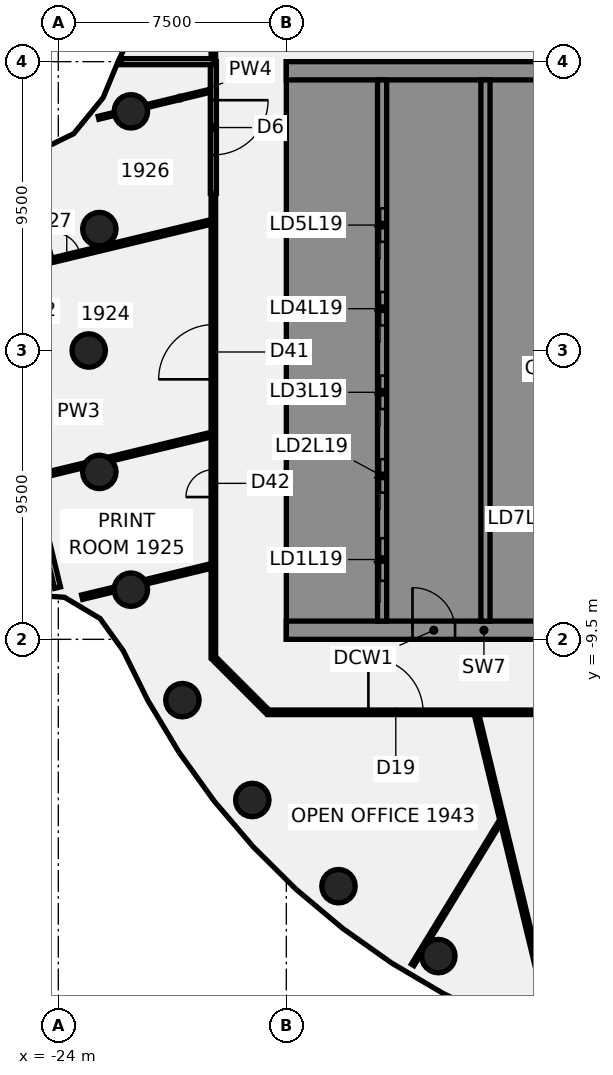
"""IFC4 building model, lengths in metres.
Left out: names, types, materials, properties, quantities, classifications, styles, units other than length and angle.
Written with IfcOpenShell. Run it as: python <this file> out.ifc"""

import sys

from ifc_helpers import new_model, si_unit, direction, frame, frame_2d, origin, origin_2d, place, context, subcontext, project, spatial, polyline, rectangle, circle, outline, extrude, element, fill, save


model = new_model("IFC4")
c1 = context("Model", 3, precision=1e-05, world=origin(), true_north=direction((0.0, 1.0)))
c2 = subcontext(c1, "Body", "Model", "MODEL_VIEW")
j1 = project(units=[si_unit("LENGTHUNIT", "METRE"), si_unit("PLANEANGLEUNIT", "RADIAN")], contexts=[c1])
p1 = place(None, origin())
s1 = spatial("IfcSite", under=j1, at=p1, CompositionType="ELEMENT")
p2 = place(p1, origin())
s2 = spatial("IfcBuilding", under=s1, at=p2, CompositionType="ELEMENT")
p3 = place(p2, frame((0.0, 0.0, 83.5)))
s3 = spatial("IfcBuildingStorey", under=s2, at=p3, CompositionType="ELEMENT", Elevation=83.5)
for number, where, z_axis, x_axis in (
    (1, (-21.613, 7.866, -0.14), (0.0, 0.0, 1.0), (1.0, 0.0, 0.0)),
    (2, (-22.651, 3.994, -0.14), (0.0, 0.0, 1.0), (1.0, 0.0, 0.0)),
    (3, (-23.0, 0.0, -0.14), (0.0, 0.0, 1.0), (1.0, 0.0, 0.0)),
    (4, (-22.651, -3.994, -0.14), (0.0, 0.0, 1.0), (1.0, 0.0, 0.0)),
    (5, (-21.613, -7.866, -0.14), (0.0, 0.0, 1.0), (1.0, 0.0, 0.0)),
    (6, (-19.919, -11.5, -0.14), (0.0, 0.0, 1.0), (1.0, 0.0, 0.0)),
    (7, (-17.619, -14.784, -0.14), (0.0, 0.0, 1.0), (1.0, 0.0, 0.0)),
    (8, (-14.784, -17.619, -0.14), (0.0, 0.0, 1.0), (1.0, 0.0, 0.0)),
    (9, (-11.5, -19.919, -0.14), (0.0, 0.0, 1.0), (1.0, 0.0, 0.0)),
    (10, (-7.866, -21.613, -0.14), (0.0, 0.0, 1.0), (1.0, 0.0, 0.0)),
):
    element("IfcColumn", number, at=place(p3, frame(where, z_axis=z_axis, x_axis=x_axis)), inside=s3, PredefinedType="COLUMN", context=c2, shape_type="SweptSolid", body=[
        extrude(circle(Radius=0.55, at=origin_2d()), origin(), (0.0, 0.0, 1.0), 3.75),
    ])
p4 = place(p3, frame((-27.267, 5.619, 0.0), z_axis=(0.0, 0.0, 1.0), x_axis=(0.234742525012, -0.972057584174, 0.0)))
e11 = element("IfcWall", 11, at=p4, inside=s3, PredefinedType="PARTITIONING", context=c2, shape_type="SweptSolid", body=[
    extrude(rectangle(XDim=13.805, YDim=0.2, at=frame_2d((6.903, 0.0))), origin(), (0.0, 0.0, 1.0), 3.01),
])
p5 = place(p4, frame((6.099, 0.0, 0.0)))
e12 = element("IfcOpeningElement", 12, at=p5, cuts=e11, PredefinedType="OPENING", context=c2, shape_type="SweptSolid", body=[
    extrude(rectangle(XDim=1.4, YDim=2.1, at=frame_2d((0.7, 1.05))), frame((0.0, 0.11, 0.0), z_axis=(0.0, -1.0, 0.0), x_axis=(1.0, 0.0, 0.0)), (0.0, 0.0, 1.0), 0.22),
])
p6 = place(p3, frame((-10.241, -11.973, 0.0), z_axis=(0.0, 0.0, 1.0), x_axis=(0.234983700505, -0.971999310955, 0.0)))
e13 = element("IfcWall", 13, at=p6, inside=s3, PredefinedType="PARTITIONING", context=c2, shape_type="SweptSolid", body=[
    extrude(rectangle(XDim=9.388, YDim=0.15, at=frame_2d((4.694, 0.0))), origin(), (0.0, 0.0, 1.0), 3.01),
])
p7 = place(p3, frame((-18.872, -10.128, 0.0), z_axis=(0.0, 0.0, 1.0), x_axis=(0.707106781187, -0.707106781187, 0.0)))
e14 = element("IfcWall", 14, at=p7, inside=s3, PredefinedType="PARTITIONING", context=c2, shape_type="SweptSolid", body=[
    extrude(rectangle(XDim=2.465, YDim=0.15, at=frame_2d((1.232, 0.0))), origin(), (0.0, 0.0, 1.0), 3.01),
])
p8 = place(p3, frame((-17.1, -11.9, 0.0), z_axis=(0.0, 0.0, 1.0), x_axis=(1.0, 0.0, 0.0)))
e15 = element("IfcWall", 15, at=p8, inside=s3, PredefinedType="PARTITIONING", context=c2, shape_type="SweptSolid", body=[
    extrude(rectangle(XDim=34.165, YDim=0.15, at=frame_2d((17.083, 0.0))), origin(), (0.0, 0.0, 1.0), 3.01),
])
p9 = place(p8, frame((13.712, 0.0, 0.0)))
e16 = element("IfcOpeningElement", 16, at=p9, cuts=e15, PredefinedType="OPENING", context=c2, shape_type="SweptSolid", body=[
    extrude(rectangle(XDim=1.8, YDim=2.1, at=frame_2d((0.9, 1.05))), frame((0.0, 0.085, 0.0), z_axis=(0.0, -1.0, 0.0), x_axis=(1.0, 0.0, 0.0)), (0.0, 0.0, 1.0), 0.17),
])
p10 = place(p8, frame((3.3, 0.0, 0.0)))
e17 = element("IfcOpeningElement", 17, at=p10, cuts=e15, PredefinedType="OPENING", context=c2, shape_type="SweptSolid", body=[
    extrude(rectangle(XDim=1.8, YDim=2.1, at=frame_2d((0.9, 1.05))), frame((0.0, 0.085, 0.0), z_axis=(0.0, -1.0, 0.0), x_axis=(1.0, 0.0, 0.0)), (0.0, 0.0, 1.0), 0.17),
])
p11 = place(p8, frame((27.428, 0.0, 0.0)))
e18 = element("IfcOpeningElement", 18, at=p11, cuts=e15, PredefinedType="OPENING", context=c2, shape_type="SweptSolid", body=[
    extrude(rectangle(XDim=1.8, YDim=2.1, at=frame_2d((0.9, 1.05))), frame((0.0, 0.085, 0.0), z_axis=(0.0, -1.0, 0.0), x_axis=(1.0, 0.0, 0.0)), (0.0, 0.0, 1.0), 0.17),
])
p12 = place(p3, frame((-26.395, 2.437, 0.0), z_axis=(0.0, 0.0, 1.0), x_axis=(0.97203792935, 0.234823899775, 0.0)))
e19 = element("IfcWall", 19, at=p12, inside=s3, PredefinedType="PARTITIONING", context=c2, shape_type="SweptSolid", body=[
    extrude(rectangle(XDim=7.635, YDim=0.15, at=frame_2d((3.818, 0.0))), origin(), (0.0, 0.0, 1.0), 3.01),
])
p13 = place(p12, frame((2.3, 0.0, 0.0)))
e20 = element("IfcOpeningElement", 20, at=p13, cuts=e19, PredefinedType="OPENING", context=c2, shape_type="SweptSolid", body=[
    extrude(rectangle(XDim=0.9, YDim=2.1, at=frame_2d((0.45, 1.05))), frame((0.0, 0.085, 0.0), z_axis=(0.0, -1.0, 0.0), x_axis=(1.0, 0.0, 0.0)), (0.0, 0.0, 1.0), 0.17),
])
p14 = place(p3, frame((-24.798, -4.174, 0.0), z_axis=(0.0, 0.0, 1.0), x_axis=(0.972053847495, 0.234757997882, 0.0)))
e21 = element("IfcWall", 21, at=p14, inside=s3, PredefinedType="PARTITIONING", context=c2, shape_type="SweptSolid", body=[
    extrude(rectangle(XDim=1.693, YDim=0.15, at=frame_2d((0.847, 0.0))), origin(), (0.0, 0.0, 1.0), 3.01),
])
p15 = place(p3, frame((-22.308, -3.572, 0.0), z_axis=(0.0, 0.0, 1.0), x_axis=(0.972049735002, 0.234775025681, 0.0)))
e22 = element("IfcWall", 22, at=p15, inside=s3, PredefinedType="PARTITIONING", context=c2, shape_type="SweptSolid", body=[
    extrude(rectangle(XDim=3.431, YDim=0.15, at=frame_2d((1.715, 0.0))), origin(), (0.0, 0.0, 1.0), 3.01),
])
p16 = place(p3, frame((-23.217, -8.113, 0.0), z_axis=(0.0, 0.0, 1.0), x_axis=(0.972021486392, 0.234891953868, 0.0)))
e23 = element("IfcWall", 23, at=p16, inside=s3, PredefinedType="PARTITIONING", context=c2, shape_type="SweptSolid", body=[
    extrude(rectangle(XDim=1.076, YDim=0.15, at=frame_2d((0.538, 0.0))), origin(), (0.0, 0.0, 1.0), 3.01),
])
p17 = place(p3, frame((-21.123, -7.607, 0.0), z_axis=(0.0, 0.0, 1.0), x_axis=(0.9720657083, 0.234708880846, 0.0)))
e24 = element("IfcWall", 24, at=p17, inside=s3, PredefinedType="PARTITIONING", context=c2, shape_type="SweptSolid", body=[
    extrude(rectangle(XDim=2.211, YDim=0.15, at=frame_2d((1.106, 0.0))), origin(), (0.0, 0.0, 1.0), 3.01),
])
p18 = place(p3, frame((-22.677, 7.655, 0.0), z_axis=(0.0, 0.0, 1.0), x_axis=(0.972046753294, 0.234787370638, 0.0)))
e25 = element("IfcWall", 25, at=p18, inside=s3, PredefinedType="PARTITIONING", context=c2, shape_type="SweptSolid", body=[
    extrude(rectangle(XDim=0.542, YDim=0.1, at=frame_2d((0.271, 0.0))), origin(), (0.0, 0.0, 1.0), 3.01),
])
p19 = place(p3, frame((-21.098, 8.037, 0.0), z_axis=(0.0, 0.0, 1.0), x_axis=(0.971998948833, 0.234985198402, 0.0)))
e26 = element("IfcWall", 26, at=p19, inside=s3, PredefinedType="PARTITIONING", context=c2, shape_type="SweptSolid", body=[
    extrude(rectangle(XDim=2.262, YDim=0.1, at=frame_2d((1.131, 0.0))), origin(), (0.0, 0.0, 1.0), 3.01),
])
p20 = place(p3, frame((-12.342, -20.206, 0.0), z_axis=(0.0, 0.0, 1.0), x_axis=(0.521349225491, 0.853343415678, 0.0)))
e27 = element("IfcWall", 27, at=p20, inside=s3, PredefinedType="PARTITIONING", context=c2, shape_type="SweptSolid", body=[
    extrude(rectangle(XDim=5.487, YDim=0.1, at=frame_2d((2.744, 0.0))), origin(), (0.0, 0.0, 1.0), 3.01),
])
p21 = place(p3, frame((-18.9, -10.1, 0.0), z_axis=(0.0, 0.0, 1.0), x_axis=(0.0, 1.0, 0.0)))
e28 = element("IfcWall", 28, at=p21, inside=s3, PredefinedType="PARTITIONING", context=c2, shape_type="SweptSolid", body=[
    extrude(rectangle(XDim=15.166, YDim=0.15, at=frame_2d((7.583, 0.0))), origin(), (0.0, 0.0, 1.0), 3.01),
])
p22 = place(p21, frame((9.151, 0.0, 0.0)))
e29 = element("IfcOpeningElement", 29, at=p22, cuts=e28, PredefinedType="OPENING", context=c2, shape_type="SweptSolid", body=[
    extrude(rectangle(XDim=1.8, YDim=2.1, at=frame_2d((0.9, 1.05))), frame((0.0, 0.085, 0.0), z_axis=(0.0, -1.0, 0.0), x_axis=(1.0, 0.0, 0.0)), (0.0, 0.0, 1.0), 0.17),
])
p23 = place(p21, frame((5.28, 0.0, 0.0)))
e30 = element("IfcOpeningElement", 30, at=p23, cuts=e28, PredefinedType="OPENING", context=c2, shape_type="SweptSolid", body=[
    extrude(rectangle(XDim=0.9, YDim=2.1, at=frame_2d((0.45, 1.05))), frame((0.0, 0.085, 0.0), z_axis=(0.0, -1.0, 0.0), x_axis=(1.0, 0.0, 0.0)), (0.0, 0.0, 1.0), 0.17),
])
p24 = place(p3, frame((-18.9, 9.6, 0.0), z_axis=(0.0, 0.0, 1.0), x_axis=(0.0, 1.0, 0.0)))
e31 = element("IfcWall", 31, at=p24, inside=s3, PredefinedType="PARTITIONING", context=c2, shape_type="SweptSolid", body=[
    extrude(rectangle(XDim=0.5, YDim=0.15, at=frame_2d((0.25, 0.0))), origin(), (0.0, 0.0, 1.0), 3.01),
])
p25 = place(p3, frame((-18.9, 9.5, 0.0), z_axis=(0.0, 0.0, 1.0), x_axis=(0.0, -1.0, 0.0)))
e32 = element("IfcWall", 32, at=p25, inside=s3, PredefinedType="SOLIDWALL", context=c2, shape_type="SweptSolid", body=[
    extrude(rectangle(XDim=4.334, YDim=0.2, at=frame_2d((2.167, 0.0))), origin(), (0.0, 0.0, 1.0), 3.014),
])
p26 = place(p25, frame((1.267, 0.0, 0.0)))
e33 = element("IfcOpeningElement", 33, at=p26, cuts=e32, PredefinedType="OPENING", context=c2, shape_type="SweptSolid", body=[
    extrude(rectangle(XDim=1.8, YDim=2.4, at=frame_2d((0.9, 1.2))), frame((0.0, 0.11, 0.0), z_axis=(0.0, -1.0, 0.0), x_axis=(1.0, 0.0, 0.0)), (0.0, 0.0, 1.0), 0.22),
])
p27 = place(p3, frame((-18.9, 9.5, 0.0), z_axis=(0.0, 0.0, 1.0), x_axis=(-1.0, 0.0, 0.0)))
e34 = element("IfcWall", 34, at=p27, inside=s3, PredefinedType="SOLIDWALL", context=c2, shape_type="SweptSolid", body=[
    extrude(rectangle(XDim=3.035, YDim=0.2, at=frame_2d((1.517, 0.0))), origin(), (0.0, 0.0, 1.0), 3.61),
])
p28 = place(p3, frame((-16.5, -9.2, 0.0), z_axis=(0.0, 0.0, 1.0), x_axis=(1.0, 0.0, 0.0)))
e35 = element("IfcWall", 35, at=p28, inside=s3, PredefinedType="SHEAR", context=c2, shape_type="SweptSolid", body=[
    extrude(rectangle(XDim=13.0, YDim=0.6, at=frame_2d((6.5, 0.0))), origin(), (0.0, 0.0, 1.0), 3.61),
])
p29 = place(p28, frame((4.15, 0.0, 0.0)))
e36 = element("IfcOpeningElement", 36, at=p29, cuts=e35, PredefinedType="OPENING", context=c2, shape_type="SweptSolid", body=[
    extrude(rectangle(XDim=1.4, YDim=2.1, at=frame_2d((0.7, 1.05))), frame((0.0, 0.31, 0.0), z_axis=(0.0, -1.0, 0.0), x_axis=(1.0, 0.0, 0.0)), (0.0, 0.0, 1.0), 0.62),
])
p30 = place(p28, frame((10.125, 0.0, 0.0)))
e37 = element("IfcOpeningElement", 37, at=p30, cuts=e35, PredefinedType="OPENING", context=c2, shape_type="SweptSolid", body=[
    extrude(rectangle(XDim=1.4, YDim=2.1, at=frame_2d((0.7, 1.05))), frame((0.0, 0.31, 0.0), z_axis=(0.0, -1.0, 0.0), x_axis=(1.0, 0.0, 0.0)), (0.0, 0.0, 1.0), 0.62),
])
p31 = place(p3, origin())
e38 = element("IfcWall", 38, at=p31, inside=s3, PredefinedType="SHEAR", context=c2, shape_type="SweptSolid", body=[
    extrude(outline(polyline([(-13.5, -8.9), (-13.5, -8.125), (-15.9, -8.125), (-15.9, -5.625), (-13.5, -5.625), (-13.5, -5.375), (-15.9, -5.375), (-15.9, -2.875), (-13.5, -2.875), (-13.5, -2.625), (-15.9, -2.625), (-15.9, -0.125), (-13.5, -0.125), (-13.5, 0.125), (-15.9, 0.125), (-15.9, 2.625), (-13.5, 2.625), (-13.5, 2.875), (-15.9, 2.875), (-15.9, 5.375), (-13.5, 5.375), (-13.5, 5.625), (-15.9, 5.625), (-15.9, 8.125), (-13.5, 8.125), (-13.5, 8.9), (-15.9, 8.9), (-16.5, 8.9), (-16.5, -8.9), (-15.9, -8.9), (-13.5, -8.9)])), origin(), (0.0, 0.0, 1.0), 3.61),
])
p32 = place(p3, frame((-16.5, 9.2, 0.0), z_axis=(0.0, 0.0, 1.0), x_axis=(1.0, 0.0, 0.0)))
e39 = element("IfcWall", 39, at=p32, inside=s3, PredefinedType="SHEAR", context=c2, shape_type="SweptSolid", body=[
    extrude(rectangle(XDim=13.0, YDim=0.6, at=frame_2d((6.5, 0.0))), origin(), (0.0, 0.0, 1.0), 3.61),
])
p33 = place(p3, origin())
e40 = element("IfcWall", 40, at=p33, inside=s3, PredefinedType="SHEAR", context=c2, shape_type="SweptSolid", body=[
    extrude(outline(polyline([(-9.8, -5.375), (-9.8, -5.625), (-7.5, -5.625), (-7.2, -5.625), (-7.2, 8.9), (-7.5, 8.9), (-9.8, 8.9), (-9.8, 8.125), (-7.5, 8.125), (-7.5, 5.625), (-9.8, 5.625), (-9.8, 5.375), (-7.5, 5.375), (-7.5, 2.875), (-9.8, 2.875), (-9.8, 2.625), (-7.5, 2.625), (-7.5, 0.125), (-9.8, 0.125), (-9.8, -0.125), (-7.5, -0.125), (-7.5, -2.625), (-9.8, -2.625), (-9.8, -2.875), (-7.5, -2.875), (-7.5, -5.375), (-9.8, -5.375)])), origin(), (0.0, 0.0, 1.0), 3.61),
])
p34 = place(p3, origin())
e41 = element("IfcWall", 41, at=p34, inside=s3, PredefinedType="SHEAR", context=c2, shape_type="SweptSolid", body=[
    extrude(outline(polyline([(-7.5, -8.125), (-9.55, -8.125), (-9.55, -5.625), (-9.8, -5.625), (-9.8, -8.125), (-9.8, -8.9), (-7.5, -8.9), (-7.5, -8.125)])), origin(), (0.0, 0.0, 1.0), 3.61),
])
p35 = place(p3, frame((-13.35, -8.9, 0.0), z_axis=(0.0, 0.0, 1.0), x_axis=(0.0, 1.0, 0.0)))
e42 = element("IfcWall", 42, at=p35, inside=s3, PredefinedType="SHEAR", context=c2, shape_type="SweptSolid", body=[
    extrude(rectangle(XDim=17.8, YDim=0.3, at=frame_2d((8.9, 0.0))), origin(), (0.0, 0.0, 1.0), 3.61),
])
p36 = place(p35, frame((1.325, 0.0, 0.0)))
e43 = element("IfcOpeningElement", 43, at=p36, cuts=e42, PredefinedType="OPENING", context=c2, shape_type="SweptSolid", body=[
    extrude(rectangle(XDim=1.4, YDim=2.1, at=frame_2d((0.7, 1.05))), frame((0.0, 0.16, 0.0), z_axis=(0.0, -1.0, 0.0), x_axis=(1.0, 0.0, 0.0)), (0.0, 0.0, 1.0), 0.32),
])
p37 = place(p35, frame((4.225, 0.0, 0.0)))
e44 = element("IfcOpeningElement", 44, at=p37, cuts=e42, PredefinedType="OPENING", context=c2, shape_type="SweptSolid", body=[
    extrude(rectangle(XDim=1.1, YDim=2.1, at=frame_2d((0.55, 1.05))), frame((0.0, 0.16, 0.0), z_axis=(0.0, -1.0, 0.0), x_axis=(1.0, 0.0, 0.0)), (0.0, 0.0, 1.0), 0.32),
])
p38 = place(p35, frame((6.975, 0.0, 0.0)))
e45 = element("IfcOpeningElement", 45, at=p38, cuts=e42, PredefinedType="OPENING", context=c2, shape_type="SweptSolid", body=[
    extrude(rectangle(XDim=1.1, YDim=2.1, at=frame_2d((0.55, 1.05))), frame((0.0, 0.16, 0.0), z_axis=(0.0, -1.0, 0.0), x_axis=(1.0, 0.0, 0.0)), (0.0, 0.0, 1.0), 0.32),
])
p39 = place(p35, frame((9.725, 0.0, 0.0)))
e46 = element("IfcOpeningElement", 46, at=p39, cuts=e42, PredefinedType="OPENING", context=c2, shape_type="SweptSolid", body=[
    extrude(rectangle(XDim=1.1, YDim=2.1, at=frame_2d((0.55, 1.05))), frame((0.0, 0.16, 0.0), z_axis=(0.0, -1.0, 0.0), x_axis=(1.0, 0.0, 0.0)), (0.0, 0.0, 1.0), 0.32),
])
p40 = place(p35, frame((12.475, 0.0, 0.0)))
e47 = element("IfcOpeningElement", 47, at=p40, cuts=e42, PredefinedType="OPENING", context=c2, shape_type="SweptSolid", body=[
    extrude(rectangle(XDim=1.1, YDim=2.1, at=frame_2d((0.55, 1.05))), frame((0.0, 0.16, 0.0), z_axis=(0.0, -1.0, 0.0), x_axis=(1.0, 0.0, 0.0)), (0.0, 0.0, 1.0), 0.32),
])
p41 = place(p3, frame((-9.95, -8.9, 0.0), z_axis=(0.0, 0.0, 1.0), x_axis=(0.0, 1.0, 0.0)))
e48 = element("IfcWall", 48, at=p41, inside=s3, PredefinedType="SHEAR", context=c2, shape_type="SweptSolid", body=[
    extrude(rectangle(XDim=17.8, YDim=0.3, at=frame_2d((8.9, 0.0))), origin(), (0.0, 0.0, 1.0), 3.61),
])
p42 = place(p10, frame((1.8, 0.0, 0.0), z_axis=(0.0, 0.0, 1.0), x_axis=(-1.0, 0.0, 0.0)))
e49 = element("IfcDoor", 49, at=p42, inside=s3, OperationType="DOUBLE_DOOR_SINGLE_SWING", PredefinedType="DOOR", context=c2, shape_type="SweptSolid", body=[
    extrude(rectangle(XDim=1.8, YDim=2.1, at=frame_2d((0.9, 1.05))), frame((0.0, 0.025, 0.0), z_axis=(0.0, -1.0, 0.0), x_axis=(1.0, 0.0, 0.0)), (0.0, 0.0, 1.0), 0.05),
])
fill(e17, e49)
p43 = place(p13, origin())
e50 = element("IfcDoor", 50, at=p43, inside=s3, OperationType="SINGLE_SWING_RIGHT", PredefinedType="DOOR", context=c2, shape_type="SweptSolid", body=[
    extrude(rectangle(XDim=0.9, YDim=2.1, at=frame_2d((0.45, 1.05))), frame((0.0, 0.025, 0.0), z_axis=(0.0, -1.0, 0.0), x_axis=(1.0, 0.0, 0.0)), (0.0, 0.0, 1.0), 0.05),
])
fill(e20, e50)
p44 = place(p22, frame((1.8, 0.0, 0.0), z_axis=(0.0, 0.0, 1.0), x_axis=(-1.0, 0.0, 0.0)))
e51 = element("IfcDoor", 51, at=p44, inside=s3, OperationType="DOUBLE_DOOR_SINGLE_SWING", PredefinedType="DOOR", context=c2, shape_type="SweptSolid", body=[
    extrude(rectangle(XDim=1.8, YDim=2.1, at=frame_2d((0.9, 1.05))), frame((0.0, 0.025, 0.0), z_axis=(0.0, -1.0, 0.0), x_axis=(1.0, 0.0, 0.0)), (0.0, 0.0, 1.0), 0.05),
])
fill(e29, e51)
p45 = place(p23, origin())
e52 = element("IfcDoor", 52, at=p45, inside=s3, OperationType="SINGLE_SWING_RIGHT", PredefinedType="DOOR", context=c2, shape_type="SweptSolid", body=[
    extrude(rectangle(XDim=0.9, YDim=2.1, at=frame_2d((0.45, 1.05))), frame((0.0, 0.025, 0.0), z_axis=(0.0, -1.0, 0.0), x_axis=(1.0, 0.0, 0.0)), (0.0, 0.0, 1.0), 0.05),
])
fill(e30, e52)
p46 = place(p26, origin())
e53 = element("IfcDoor", 53, at=p46, inside=s3, OperationType="SINGLE_SWING_LEFT", PredefinedType="DOOR", context=c2, shape_type="SweptSolid", body=[
    extrude(rectangle(XDim=1.8, YDim=2.4, at=frame_2d((0.9, 1.2))), frame((0.0, 0.025, 0.0), z_axis=(0.0, -1.0, 0.0), x_axis=(1.0, 0.0, 0.0)), (0.0, 0.0, 1.0), 0.05),
])
fill(e33, e53)
p47 = place(p29, origin())
e54 = element("IfcDoor", 54, at=p47, inside=s3, OperationType="SINGLE_SWING_LEFT", PredefinedType="DOOR", context=c2, shape_type="SweptSolid", body=[
    extrude(rectangle(XDim=1.4, YDim=2.1, at=frame_2d((0.7, 1.05))), frame((0.0, 0.025, 0.0), z_axis=(0.0, -1.0, 0.0), x_axis=(1.0, 0.0, 0.0)), (0.0, 0.0, 1.0), 0.05),
])
fill(e36, e54)
p48 = place(p36, origin())
e55 = element("IfcDoor", 55, at=p48, inside=s3, OperationType="SLIDING_TO_LEFT", PredefinedType="DOOR", context=c2, shape_type="SweptSolid", body=[
    extrude(rectangle(XDim=1.4, YDim=2.1, at=frame_2d((0.7, 1.05))), frame((0.0, 0.025, 0.0), z_axis=(0.0, -1.0, 0.0), x_axis=(1.0, 0.0, 0.0)), (0.0, 0.0, 1.0), 0.05),
])
fill(e43, e55)
p49 = place(p37, origin())
e56 = element("IfcDoor", 56, at=p49, inside=s3, OperationType="SLIDING_TO_LEFT", PredefinedType="DOOR", context=c2, shape_type="SweptSolid", body=[
    extrude(rectangle(XDim=1.1, YDim=2.1, at=frame_2d((0.55, 1.05))), frame((0.0, 0.025, 0.0), z_axis=(0.0, -1.0, 0.0), x_axis=(1.0, 0.0, 0.0)), (0.0, 0.0, 1.0), 0.05),
])
fill(e44, e56)
p50 = place(p38, origin())
e57 = element("IfcDoor", 57, at=p50, inside=s3, OperationType="SLIDING_TO_LEFT", PredefinedType="DOOR", context=c2, shape_type="SweptSolid", body=[
    extrude(rectangle(XDim=1.1, YDim=2.1, at=frame_2d((0.55, 1.05))), frame((0.0, 0.025, 0.0), z_axis=(0.0, -1.0, 0.0), x_axis=(1.0, 0.0, 0.0)), (0.0, 0.0, 1.0), 0.05),
])
fill(e45, e57)
p51 = place(p39, origin())
e58 = element("IfcDoor", 58, at=p51, inside=s3, OperationType="SLIDING_TO_LEFT", PredefinedType="DOOR", context=c2, shape_type="SweptSolid", body=[
    extrude(rectangle(XDim=1.1, YDim=2.1, at=frame_2d((0.55, 1.05))), frame((0.0, 0.025, 0.0), z_axis=(0.0, -1.0, 0.0), x_axis=(1.0, 0.0, 0.0)), (0.0, 0.0, 1.0), 0.05),
])
fill(e46, e58)
p52 = place(p40, origin())
e59 = element("IfcDoor", 59, at=p52, inside=s3, OperationType="SLIDING_TO_LEFT", PredefinedType="DOOR", context=c2, shape_type="SweptSolid", body=[
    extrude(rectangle(XDim=1.1, YDim=2.1, at=frame_2d((0.55, 1.05))), frame((0.0, 0.025, 0.0), z_axis=(0.0, -1.0, 0.0), x_axis=(1.0, 0.0, 0.0)), (0.0, 0.0, 1.0), 0.05),
])
fill(e47, e59)
save(model, sys.argv[1])
